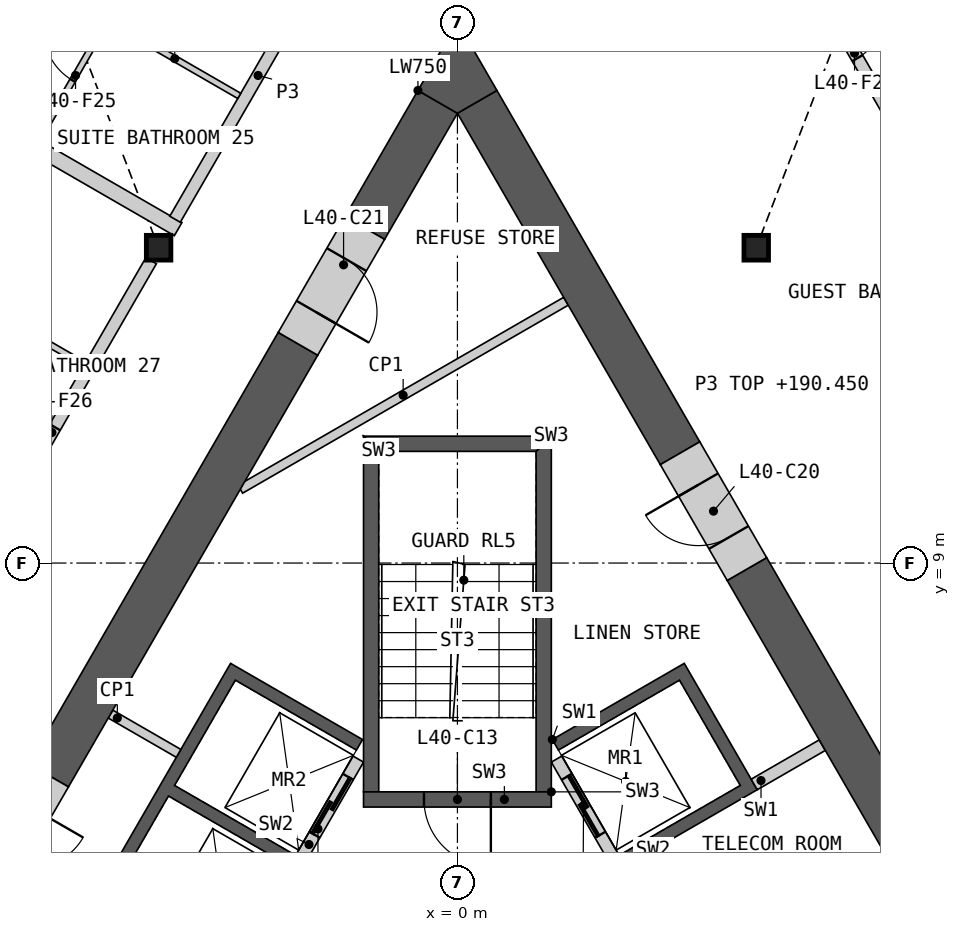
"""IFC4 building model, lengths in metres.
Left out: names, types, materials, properties, quantities, classifications, styles, units other than length and angle.
Written with IfcOpenShell. Run it as: python <this file> out.ifc"""

import sys

from ifc_helpers import new_model, si_unit, direction, frame, frame_2d, origin, origin_2d, place, context, subcontext, project, spatial, polyline, rectangle, i_section, outline, extrude, element, fill, save


model = new_model("IFC4")
c1 = context("Model", 3, precision=1e-05, world=origin(), true_north=direction((0.0, 1.0)))
c2 = subcontext(c1, "Body", "Model", "MODEL_VIEW")
j1 = project(units=[si_unit("LENGTHUNIT", "METRE"), si_unit("PLANEANGLEUNIT", "RADIAN")], contexts=[c1])
p1 = place(None, origin())
s1 = spatial("IfcSite", under=j1, at=p1, CompositionType="ELEMENT")
p2 = place(p1, origin())
s2 = spatial("IfcBuilding", under=s1, at=p2, CompositionType="ELEMENT")
p3 = place(p2, frame((0.0, 0.0, 187.2)))
s3 = spatial("IfcBuildingStorey", under=s2, at=p3, CompositionType="ELEMENT", Elevation=187.2)
for number, where, z_axis, x_axis in (
    (1, (-4.914, 14.186, 0.0), (0.0, 0.0, 1.0), (1.0, 0.0, 0.0)),
    (2, (4.914, 14.186, 0.0), (0.0, 0.0, 1.0), (1.0, 0.0, 0.0)),
):
    element("IfcColumn", number, at=place(p3, frame(where, z_axis=z_axis, x_axis=x_axis)), inside=s3, PredefinedType="COLUMN", context=c2, shape_type="SweptSolid", body=[
        extrude(i_section(OverallWidth=0.404, OverallDepth=0.407, WebThickness=0.027, FlangeThickness=0.044, at=origin_2d()), origin(), (0.0, 0.0, 1.0), 3.6),
    ])
p4 = place(p3, origin())
e3 = element("IfcWall", 3, at=p4, inside=s3, PredefinedType="SHEAR", context=c2, shape_type="SweptSolid", body=[
    extrude(outline(polyline([(1.561, 6.097), (3.731, 7.35), (4.931, 5.272), (2.76, 4.019), (2.66, 4.192), (4.652, 5.342), (3.652, 7.074), (1.66, 5.924), (1.561, 6.097)])), origin(), (0.0, 0.0, 1.0), 3.25),
])
p5 = place(p3, frame((5.817, -1.476, 0.0), z_axis=(0.0, 0.0, 1.0), x_axis=(-0.500002616675, 0.866023893041, 0.0)))
e4 = element("IfcWall", 4, at=p5, inside=s3, PredefinedType="SOLIDWALL", context=c2, shape_type="SweptSolid", body=[
    extrude(rectangle(XDim=8.373, YDim=0.2, at=frame_2d((4.187, 0.0))), origin(), (0.0, 0.0, 1.0), 3.25),
])
p6 = place(p5, frame((1.537, 0.0, 0.0)))
e5 = element("IfcOpeningElement", 5, at=p6, cuts=e4, PredefinedType="OPENING", context=c2, shape_type="SweptSolid", body=[
    extrude(rectangle(XDim=0.9, YDim=2.1, at=frame_2d((0.45, 1.05))), frame((0.0, 0.11, 0.0), z_axis=(0.0, -1.0, 0.0), x_axis=(1.0, 0.0, 0.0)), (0.0, 0.0, 1.0), 0.22),
])
p7 = place(p5, frame((4.837, 0.0, 0.0)))
e6 = element("IfcOpeningElement", 6, at=p7, cuts=e4, PredefinedType="OPENING", context=c2, shape_type="SweptSolid", body=[
    extrude(rectangle(XDim=0.9, YDim=2.1, at=frame_2d((0.45, 1.05))), frame((0.0, 0.11, 0.0), z_axis=(0.0, -1.0, 0.0), x_axis=(1.0, 0.0, 0.0)), (0.0, 0.0, 1.0), 0.22),
])
p8 = place(p5, frame((6.937, 0.0, 0.0)))
e7 = element("IfcOpeningElement", 7, at=p8, cuts=e4, PredefinedType="OPENING", context=c2, shape_type="SweptSolid", body=[
    extrude(rectangle(XDim=1.1, YDim=2.1, at=frame_2d((0.55, 1.05))), frame((0.0, 0.11, 0.0), z_axis=(0.0, -1.0, 0.0), x_axis=(1.0, 0.0, 0.0)), (0.0, 0.0, 1.0), 0.22),
])
p9 = place(p3, frame((4.881, 5.358, 0.0), z_axis=(0.0, 0.0, 1.0), x_axis=(0.866084958089, 0.499896834728, 0.0)))
e8 = element("IfcWall", 8, at=p9, inside=s3, PredefinedType="SHEAR", context=c2, shape_type="SweptSolid", body=[
    extrude(rectangle(XDim=1.293, YDim=0.2, at=frame_2d((0.646, 0.0))), origin(), (0.0, 0.0, 1.0), 3.25),
])
p10 = place(p3, origin())
e9 = element("IfcWall", 9, at=p10, inside=s3, PredefinedType="SHEAR", context=c2, shape_type="SweptSolid", body=[
    extrude(outline(polyline([(-4.96, 0.208), (-7.131, 1.461), (-3.731, 7.35), (-1.561, 6.097), (-1.66, 5.924), (-3.652, 7.074), (-4.652, 5.342), (-2.66, 4.192), (-2.76, 4.019), (-4.752, 5.169), (-5.752, 3.437), (-3.76, 2.287), (-3.861, 2.113), (-5.852, 3.263), (-6.852, 1.531), (-4.861, 0.381), (-4.96, 0.208)])), origin(), (0.0, 0.0, 1.0), 3.25),
])
p11 = place(p3, frame((-1.631, 5.776, 0.0), z_axis=(0.0, 0.0, 1.0), x_axis=(-0.499992876559, -0.866029516466, 0.0)))
e10 = element("IfcWall", 10, at=p11, inside=s3, PredefinedType="SOLIDWALL", context=c2, shape_type="SweptSolid", body=[
    extrude(rectangle(XDim=6.486, YDim=0.2, at=frame_2d((3.243, 0.0))), origin(), (0.0, 0.0, 1.0), 3.25),
])
p12 = place(p11, frame((0.337, 0.0, 0.0)))
e11 = element("IfcOpeningElement", 11, at=p12, cuts=e10, PredefinedType="OPENING", context=c2, shape_type="SweptSolid", body=[
    extrude(rectangle(XDim=1.1, YDim=2.1, at=frame_2d((0.55, 1.05))), frame((0.0, 0.11, 0.0), z_axis=(0.0, -1.0, 0.0), x_axis=(1.0, 0.0, 0.0)), (0.0, 0.0, 1.0), 0.22),
])
p13 = place(p11, frame((2.537, 0.0, 0.0)))
e12 = element("IfcOpeningElement", 12, at=p13, cuts=e10, PredefinedType="OPENING", context=c2, shape_type="SweptSolid", body=[
    extrude(rectangle(XDim=1.1, YDim=2.1, at=frame_2d((0.55, 1.05))), frame((0.0, 0.11, 0.0), z_axis=(0.0, -1.0, 0.0), x_axis=(1.0, 0.0, 0.0)), (0.0, 0.0, 1.0), 0.22),
])
p14 = place(p3, origin())
e13 = element("IfcWall", 13, at=p14, inside=s3, PredefinedType="SHEAR", context=c2, shape_type="SweptSolid", body=[
    extrude(outline(polyline([(1.544, 5.237), (1.544, 11.087), (1.294, 10.837), (1.294, 5.237), (1.544, 5.237)])), origin(), (0.0, 0.0, 1.0), 3.25),
])
p15 = place(p3, origin())
e14 = element("IfcWall", 14, at=p15, inside=s3, PredefinedType="SHEAR", context=c2, shape_type="SweptSolid", body=[
    extrude(outline(polyline([(1.544, 11.087), (-1.544, 11.087), (-1.294, 10.837), (1.294, 10.837), (1.544, 11.087)])), origin(), (0.0, 0.0, 1.0), 3.25),
])
p16 = place(p3, origin())
e15 = element("IfcWall", 15, at=p16, inside=s3, PredefinedType="SHEAR", context=c2, shape_type="SweptSolid", body=[
    extrude(outline(polyline([(-1.294, 10.837), (-1.544, 11.087), (-1.544, 5.237), (-1.294, 5.237), (-1.294, 10.837)])), origin(), (0.0, 0.0, 1.0), 3.25),
])
p17 = place(p3, frame((1.544, 5.112, 0.0), z_axis=(0.0, 0.0, 1.0), x_axis=(-1.0, 0.0, 0.0)))
e16 = element("IfcWall", 16, at=p17, inside=s3, PredefinedType="SHEAR", context=c2, shape_type="SweptSolid", body=[
    extrude(rectangle(XDim=3.088, YDim=0.25, at=frame_2d((1.544, 0.0))), origin(), (0.0, 0.0, 1.0), 3.25),
])
p18 = place(p17, frame((0.994, 0.0, 0.0)))
e17 = element("IfcOpeningElement", 17, at=p18, cuts=e16, PredefinedType="OPENING", context=c2, shape_type="SweptSolid", body=[
    extrude(rectangle(XDim=1.1, YDim=2.1, at=frame_2d((0.55, 1.05))), frame((0.0, 0.135, 0.0), z_axis=(0.0, -1.0, 0.0), x_axis=(1.0, 0.0, 0.0)), (0.0, 0.0, 1.0), 0.27),
])
p19 = place(p3, frame((-5.705, 6.516, 0.0), z_axis=(0.0, 0.0, 1.0), x_axis=(0.866003189247, -0.500038474733, 0.0)))
e18 = element("IfcWall", 18, at=p19, inside=s3, PredefinedType="PARTITIONING", context=c2, shape_type="SweptSolid", body=[
    extrude(rectangle(XDim=1.293, YDim=0.15, at=frame_2d((0.646, 0.0))), origin(), (0.0, 0.0, 1.0), 3.25),
])
p20 = place(p3, frame((1.785, 13.306, 0.0), z_axis=(0.0, 0.0, 1.0), x_axis=(-0.866038319186, -0.499977629202, 0.0)))
e19 = element("IfcWall", 19, at=p20, inside=s3, PredefinedType="PARTITIONING", context=c2, shape_type="SweptSolid", body=[
    extrude(rectangle(XDim=6.184, YDim=0.15, at=frame_2d((3.092, 0.0))), origin(), (0.0, 0.0, 1.0), 3.25),
])
p21 = place(p3, frame((3.661, 10.806, 0.0), z_axis=(0.0, 0.0, 1.0), x_axis=(-0.500014865866, 0.866016820803, 0.0)))
e20 = element("IfcWall", 20, at=p21, inside=s3, PredefinedType="SHEAR", context=c2, shape_type="SweptSolid", body=[
    extrude(rectangle(XDim=6.673, YDim=0.75, at=frame_2d((3.336, 0.0))), origin(), (0.0, 0.0, 1.0), 3.25),
])
p22 = place(p3, frame((7.964, 3.354, 0.0), z_axis=(0.0, 0.0, 1.0), x_axis=(-0.50002928721, 0.866008494146, 0.0)))
e21 = element("IfcWall", 21, at=p22, inside=s3, PredefinedType="SHEAR", context=c2, shape_type="SweptSolid", body=[
    extrude(rectangle(XDim=6.405, YDim=0.75, at=frame_2d((3.203, 0.0))), origin(), (0.0, 0.0, 1.0), 3.25),
])
p23 = place(p3, frame((-2.622, 12.606, 0.0), z_axis=(0.0, 0.0, 1.0), x_axis=(-0.500014611105, -0.866016967894, 0.0)))
e22 = element("IfcWall", 22, at=p23, inside=s3, PredefinedType="SHEAR", context=c2, shape_type="SweptSolid", body=[
    extrude(rectangle(XDim=8.198, YDim=0.75, at=frame_2d((4.099, 0.0))), origin(), (0.0, 0.0, 1.0), 3.25),
])
p24 = place(p3, frame((-0.325, 16.585, 0.0), z_axis=(0.0, 0.0, 1.0), x_axis=(-0.500019473932, -0.866014160212, 0.0)))
e23 = element("IfcWall", 23, at=p24, inside=s3, PredefinedType="SHEAR", context=c2, shape_type="SweptSolid", body=[
    extrude(rectangle(XDim=2.396, YDim=0.75, at=frame_2d((1.198, 0.0))), origin(), (0.0, 0.0, 1.0), 3.25),
])
p25 = place(p3, origin())
e24 = element("IfcWall", 24, at=p25, inside=s3, PredefinedType="SHEAR", context=c2, shape_type="SweptSolid", body=[
    extrude(outline(polyline([(-0.649, 16.773), (0.0, 17.898), (0.649, 16.773), (0.0, 16.398), (-0.649, 16.773)])), origin(), (0.0, 0.0, 1.0), 3.25),
])
p26 = place(p3, frame((-6.721, 5.506, 0.0), z_axis=(0.0, 0.0, 1.0), x_axis=(-0.499946605688, -0.86605622881, 0.0)))
e25 = element("IfcWall", 25, at=p26, inside=s3, PredefinedType="SHEAR", context=c2, shape_type="SweptSolid", body=[
    extrude(rectangle(XDim=2.2, YDim=0.75, at=frame_2d((1.1, 0.0))), origin(), (0.0, 0.0, 1.0), 3.25),
])
p27 = place(p26, frame((0.6, 0.0, 0.0)))
e26 = element("IfcOpeningElement", 26, at=p27, cuts=e25, PredefinedType="OPENING", context=c2, shape_type="SweptSolid", body=[
    extrude(rectangle(XDim=1.0, YDim=2.1, at=frame_2d((0.5, 1.05))), frame((0.0, 0.385, 0.0), z_axis=(0.0, -1.0, 0.0), x_axis=(1.0, 0.0, 0.0)), (0.0, 0.0, 1.0), 0.77),
])
p28 = place(p3, frame((4.761, 8.901, 0.0), z_axis=(0.0, 0.0, 1.0), x_axis=(-0.499898558967, 0.866083962871, 0.0)))
e27 = element("IfcWall", 27, at=p28, inside=s3, PredefinedType="SHEAR", context=c2, shape_type="SweptSolid", body=[
    extrude(rectangle(XDim=2.2, YDim=0.75, at=frame_2d((1.1, 0.0))), origin(), (0.0, 0.0, 1.0), 3.25),
])
p29 = place(p28, frame((0.6, 0.0, 0.0)))
e28 = element("IfcOpeningElement", 28, at=p29, cuts=e27, PredefinedType="OPENING", context=c2, shape_type="SweptSolid", body=[
    extrude(rectangle(XDim=1.0, YDim=2.1, at=frame_2d((0.5, 1.05))), frame((0.0, 0.385, 0.0), z_axis=(0.0, -1.0, 0.0), x_axis=(1.0, 0.0, 0.0)), (0.0, 0.0, 1.0), 0.77),
])
p30 = place(p3, frame((-1.522, 14.511, 0.0), z_axis=(0.0, 0.0, 1.0), x_axis=(-0.499946605688, -0.86605622881, 0.0)))
e29 = element("IfcWall", 29, at=p30, inside=s3, PredefinedType="SHEAR", context=c2, shape_type="SweptSolid", body=[
    extrude(rectangle(XDim=2.2, YDim=0.75, at=frame_2d((1.1, 0.0))), origin(), (0.0, 0.0, 1.0), 3.25),
])
p31 = place(p30, frame((0.6, 0.0, 0.0)))
e30 = element("IfcOpeningElement", 30, at=p31, cuts=e29, PredefinedType="OPENING", context=c2, shape_type="SweptSolid", body=[
    extrude(rectangle(XDim=1.0, YDim=2.1, at=frame_2d((0.5, 1.05))), frame((0.0, 0.385, 0.0), z_axis=(0.0, -1.0, 0.0), x_axis=(1.0, 0.0, 0.0)), (0.0, 0.0, 1.0), 0.77),
])
p32 = place(p3, frame((5.377, 19.385, 0.0), z_axis=(0.0, 0.0, 1.0), x_axis=(0.500000757641, -0.86602496636, 0.0)))
e31 = element("IfcWall", 31, at=p32, inside=s3, PredefinedType="PARTITIONING", context=c2, shape_type="SweptSolid", body=[
    extrude(rectangle(XDim=28.198, YDim=0.2, at=frame_2d((14.099, 0.0))), origin(), (0.0, 0.0, 1.0), 3.25),
])
p33 = place(p32, frame((22.735, 0.0, 0.0)))
e32 = element("IfcOpeningElement", 32, at=p33, cuts=e31, PredefinedType="OPENING", context=c2, shape_type="SweptSolid", body=[
    extrude(rectangle(XDim=1.8, YDim=2.1, at=frame_2d((0.9, 1.05))), frame((0.0, 0.11, 0.0), z_axis=(0.0, -1.0, 0.0), x_axis=(1.0, 0.0, 0.0)), (0.0, 0.0, 1.0), 0.22),
])
p34 = place(p32, frame((14.402, 0.0, 0.0)))
e33 = element("IfcOpeningElement", 33, at=p34, cuts=e31, PredefinedType="OPENING", context=c2, shape_type="SweptSolid", body=[
    extrude(rectangle(XDim=1.0, YDim=2.1, at=frame_2d((0.5, 1.05))), frame((0.0, 0.11, 0.0), z_axis=(0.0, -1.0, 0.0), x_axis=(1.0, 0.0, 0.0)), (0.0, 0.0, 1.0), 0.22),
])
p35 = place(p32, frame((12.796, 0.0, 0.0)))
e34 = element("IfcOpeningElement", 34, at=p35, cuts=e31, PredefinedType="OPENING", context=c2, shape_type="SweptSolid", body=[
    extrude(rectangle(XDim=1.0, YDim=2.1, at=frame_2d((0.5, 1.05))), frame((0.0, 0.11, 0.0), z_axis=(0.0, -1.0, 0.0), x_axis=(1.0, 0.0, 0.0)), (0.0, 0.0, 1.0), 0.22),
])
p36 = place(p32, frame((4.164, 0.0, 0.0)))
e35 = element("IfcOpeningElement", 35, at=p36, cuts=e31, PredefinedType="OPENING", context=c2, shape_type="SweptSolid", body=[
    extrude(rectangle(XDim=1.0, YDim=2.1, at=frame_2d((0.5, 1.05))), frame((0.0, 0.11, 0.0), z_axis=(0.0, -1.0, 0.0), x_axis=(1.0, 0.0, 0.0)), (0.0, 0.0, 1.0), 0.22),
])
p37 = place(p32, frame((1.452, 0.0, 0.0)))
e36 = element("IfcOpeningElement", 36, at=p37, cuts=e31, PredefinedType="OPENING", context=c2, shape_type="SweptSolid", body=[
    extrude(rectangle(XDim=0.95, YDim=2.1, at=frame_2d((0.475, 1.05))), frame((0.0, 0.11, 0.0), z_axis=(0.0, -1.0, 0.0), x_axis=(1.0, 0.0, 0.0)), (0.0, 0.0, 1.0), 0.22),
])
p38 = place(p3, frame((-15.835, 20.983, 0.0), z_axis=(0.0, 0.0, 1.0), x_axis=(0.866022720283, -0.500004647933, 0.0)))
e37 = element("IfcWall", 37, at=p38, inside=s3, PredefinedType="PARTITIONING", context=c2, shape_type="SweptSolid", body=[
    extrude(rectangle(XDim=12.981, YDim=0.25, at=frame_2d((6.49, 0.0))), origin(), (0.0, 0.0, 1.0), 2.404),
])
p39 = place(p3, frame((-9.705, 5.888, 0.0), z_axis=(0.0, 0.0, 1.0), x_axis=(0.50000393355, 0.866023132736, 0.0)))
e38 = element("IfcWall", 38, at=p39, inside=s3, PredefinedType="PARTITIONING", context=c2, shape_type="SweptSolid", body=[
    extrude(rectangle(XDim=9.335, YDim=0.2, at=frame_2d((4.667, 0.0))), origin(), (0.0, 0.0, 1.0), 3.25),
])
p40 = place(p39, frame((5.172, 0.0, 0.0)))
e39 = element("IfcOpeningElement", 39, at=p40, cuts=e38, PredefinedType="OPENING", context=c2, shape_type="SweptSolid", body=[
    extrude(rectangle(XDim=1.0, YDim=2.1, at=frame_2d((0.5, 1.05))), frame((0.0, 0.11, 0.0), z_axis=(0.0, -1.0, 0.0), x_axis=(1.0, 0.0, 0.0)), (0.0, 0.0, 1.0), 0.22),
])
p41 = place(p39, frame((3.565, 0.0, 0.0)))
e40 = element("IfcOpeningElement", 40, at=p41, cuts=e38, PredefinedType="OPENING", context=c2, shape_type="SweptSolid", body=[
    extrude(rectangle(XDim=1.0, YDim=2.1, at=frame_2d((0.5, 1.05))), frame((0.0, 0.11, 0.0), z_axis=(0.0, -1.0, 0.0), x_axis=(1.0, 0.0, 0.0)), (0.0, 0.0, 1.0), 0.22),
])
p42 = place(p3, frame((-4.644, 14.655, 0.0), z_axis=(0.0, 0.0, 1.0), x_axis=(0.49998041698, 0.866036709751, 0.0)))
e41 = element("IfcWall", 41, at=p42, inside=s3, PredefinedType="PARTITIONING", context=c2, shape_type="SweptSolid", body=[
    extrude(rectangle(XDim=5.462, YDim=0.2, at=frame_2d((2.731, 0.0))), origin(), (0.0, 0.0, 1.0), 3.25),
])
p43 = place(p42, frame((4.01, 0.0, 0.0)))
e42 = element("IfcOpeningElement", 42, at=p43, cuts=e41, PredefinedType="OPENING", context=c2, shape_type="SweptSolid", body=[
    extrude(rectangle(XDim=1.1, YDim=2.1, at=frame_2d((0.55, 1.05))), frame((0.0, 0.11, 0.0), z_axis=(0.0, -1.0, 0.0), x_axis=(1.0, 0.0, 0.0)), (0.0, 0.0, 1.0), 0.22),
])
p44 = place(p3, frame((-8.328, 13.473, 0.0), z_axis=(0.0, 0.0, 1.0), x_axis=(0.499992051641, 0.866029992723, 0.0)))
e43 = element("IfcWall", 43, at=p44, inside=s3, PredefinedType="PARTITIONING", context=c2, shape_type="SweptSolid", body=[
    extrude(rectangle(XDim=5.2, YDim=0.1, at=frame_2d((2.6, 0.0))), origin(), (0.0, 0.0, 1.0), 2.404),
])
p45 = place(p44, frame((4.0, 0.0, 0.0)))
e44 = element("IfcOpeningElement", 44, at=p45, cuts=e43, PredefinedType="OPENING", context=c2, shape_type="SweptSolid", body=[
    extrude(rectangle(XDim=0.95, YDim=2.1, at=frame_2d((0.475, 1.05))), frame((0.0, 0.06, 0.0), z_axis=(0.0, -1.0, 0.0), x_axis=(1.0, 0.0, 0.0)), (0.0, 0.0, 1.0), 0.12),
])
p46 = place(p44, frame((0.25, 0.0, 0.0)))
e45 = element("IfcOpeningElement", 45, at=p46, cuts=e43, PredefinedType="OPENING", context=c2, shape_type="SweptSolid", body=[
    extrude(rectangle(XDim=0.95, YDim=2.1, at=frame_2d((0.475, 1.05))), frame((0.0, 0.06, 0.0), z_axis=(0.0, -1.0, 0.0), x_axis=(1.0, 0.0, 0.0)), (0.0, 0.0, 1.0), 0.12),
])
p47 = place(p3, frame((-5.71, 17.908, 0.0), z_axis=(0.0, 0.0, 1.0), x_axis=(0.866057815567, -0.499943856944, 0.0)))
e46 = element("IfcWall", 46, at=p47, inside=s3, PredefinedType="PARTITIONING", context=c2, shape_type="SweptSolid", body=[
    extrude(rectangle(XDim=2.45, YDim=0.1, at=frame_2d((1.225, 0.0))), origin(), (0.0, 0.0, 1.0), 2.404),
])
p48 = place(p3, frame((-8.26, 13.492, 0.0), z_axis=(0.0, 0.0, 1.0), x_axis=(0.866014668023, -0.500018594424, 0.0)))
e47 = element("IfcWall", 47, at=p48, inside=s3, PredefinedType="PARTITIONING", context=c2, shape_type="SweptSolid", body=[
    extrude(rectangle(XDim=2.45, YDim=0.1, at=frame_2d((1.225, 0.0))), origin(), (0.0, 0.0, 1.0), 2.404),
])
p49 = place(p8, origin())
e48 = element("IfcDoor", 48, at=p49, inside=s3, OperationType="SLIDING_TO_LEFT", PredefinedType="DOOR", context=c2, shape_type="SweptSolid", body=[
    extrude(rectangle(XDim=1.1, YDim=2.1, at=frame_2d((0.55, 1.05))), frame((0.0, 0.025, 0.0), z_axis=(0.0, -1.0, 0.0), x_axis=(1.0, 0.0, 0.0)), (0.0, 0.0, 1.0), 0.05),
])
fill(e7, e48)
p50 = place(p12, origin())
e49 = element("IfcDoor", 49, at=p50, inside=s3, OperationType="SLIDING_TO_LEFT", PredefinedType="DOOR", context=c2, shape_type="SweptSolid", body=[
    extrude(rectangle(XDim=1.1, YDim=2.1, at=frame_2d((0.55, 1.05))), frame((0.0, 0.025, 0.0), z_axis=(0.0, -1.0, 0.0), x_axis=(1.0, 0.0, 0.0)), (0.0, 0.0, 1.0), 0.05),
])
fill(e11, e49)
p51 = place(p18, origin())
e50 = element("IfcDoor", 50, at=p51, inside=s3, OperationType="SINGLE_SWING_LEFT", PredefinedType="DOOR", context=c2, shape_type="SweptSolid", body=[
    extrude(rectangle(XDim=1.1, YDim=2.1, at=frame_2d((0.55, 1.05))), frame((0.0, 0.025, 0.0), z_axis=(0.0, -1.0, 0.0), x_axis=(1.0, 0.0, 0.0)), (0.0, 0.0, 1.0), 0.05),
])
fill(e17, e50)
p52 = place(p29, origin())
e51 = element("IfcDoor", 51, at=p52, inside=s3, OperationType="SINGLE_SWING_RIGHT", PredefinedType="DOOR", context=c2, shape_type="SweptSolid", body=[
    extrude(rectangle(XDim=1.0, YDim=2.1, at=frame_2d((0.5, 1.05))), frame((0.0, 0.13, 0.0), z_axis=(0.0, -1.0, 0.0), x_axis=(1.0, 0.0, 0.0)), (0.0, 0.0, 1.0), 0.05),
])
fill(e28, e51)
p53 = place(p31, origin())
e52 = element("IfcDoor", 52, at=p53, inside=s3, OperationType="SINGLE_SWING_RIGHT", PredefinedType="DOOR", context=c2, shape_type="SweptSolid", body=[
    extrude(rectangle(XDim=1.0, YDim=2.1, at=frame_2d((0.5, 1.05))), frame((0.0, 0.13, 0.0), z_axis=(0.0, -1.0, 0.0), x_axis=(1.0, 0.0, 0.0)), (0.0, 0.0, 1.0), 0.05),
])
fill(e30, e52)
p54 = place(p37, origin())
e53 = element("IfcDoor", 53, at=p54, inside=s3, OperationType="SINGLE_SWING_LEFT", PredefinedType="DOOR", context=c2, shape_type="SweptSolid", body=[
    extrude(rectangle(XDim=0.95, YDim=2.1, at=frame_2d((0.475, 1.05))), frame((0.0, 0.025, 0.0), z_axis=(0.0, -1.0, 0.0), x_axis=(1.0, 0.0, 0.0)), (0.0, 0.0, 1.0), 0.05),
])
fill(e36, e53)
p55 = place(p45, origin())
e54 = element("IfcDoor", 54, at=p55, inside=s3, OperationType="SINGLE_SWING_RIGHT", PredefinedType="DOOR", context=c2, shape_type="SweptSolid", body=[
    extrude(rectangle(XDim=0.95, YDim=2.1, at=frame_2d((0.475, 1.05))), frame((0.0, 0.025, 0.0), z_axis=(0.0, -1.0, 0.0), x_axis=(1.0, 0.0, 0.0)), (0.0, 0.0, 1.0), 0.05),
])
fill(e44, e54)
p56 = place(p40, origin())
e55 = element("IfcDoor", 55, at=p56, inside=s3, OperationType="SINGLE_SWING_LEFT", PredefinedType="DOOR", context=c2, shape_type="SweptSolid", body=[
    extrude(rectangle(XDim=1.0, YDim=2.1, at=frame_2d((0.5, 1.05))), frame((0.0, 0.025, 0.0), z_axis=(0.0, -1.0, 0.0), x_axis=(1.0, 0.0, 0.0)), (0.0, 0.0, 1.0), 0.05),
])
fill(e39, e55)
save(model, sys.argv[1])
